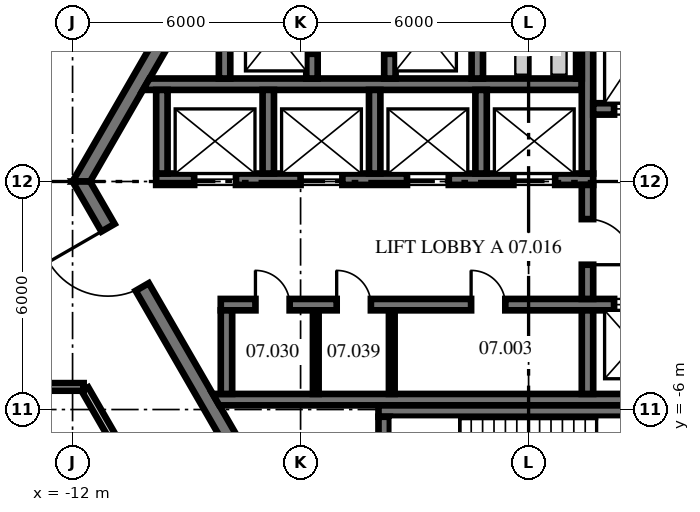
"""IFC4 building model, lengths in metres.
Left out: names, types, materials, properties, quantities, classifications, styles, units other than length and angle.
Written with IfcOpenShell. Run it as: python <this file> out.ifc"""

import sys

from ifc_helpers import new_model, si_unit, direction, frame, frame_2d, origin, place, context, subcontext, project, spatial, polyline, rectangle, outline, extrude, source, transform, mapped, element, fill, save


model = new_model("IFC4")
c1 = context("Model", 3, precision=1e-05, world=origin(), true_north=direction((0.0, 1.0)))
c2 = subcontext(c1, "Body", "Model", "MODEL_VIEW")
j1 = project(units=[si_unit("LENGTHUNIT", "METRE"), si_unit("PLANEANGLEUNIT", "RADIAN")], contexts=[c1])
p1 = place(None, origin())
s1 = spatial("IfcSite", under=j1, at=p1, CompositionType="ELEMENT")
p2 = place(p1, origin())
s2 = spatial("IfcBuilding", under=s1, at=p2, CompositionType="ELEMENT")
p3 = place(p2, frame((0.0, 0.0, 33.2)))
s3 = spatial("IfcBuildingStorey", under=s2, at=p3, CompositionType="ELEMENT", Elevation=33.2)
m1 = source(origin(), c2, "Body", "SweptSolid", [
    extrude(outline(polyline([(-0.115, -0.2), (11.885, -0.2), (11.654, 0.2), (0.115, 0.2), (-0.115, -0.2)])), origin(), (0.0, 0.0, 1.0), 4.1),
])
p4 = place(p3, frame((-5.885, 10.192, 0.0), z_axis=(0.0, 0.0, 1.0), x_axis=(-0.499996592174, -0.866027371285, 0.0)))
e1 = element("IfcWall", 1, at=p4, inside=s3, PredefinedType="SHEAR", context=c2, shape_type="MappedRepresentation", body=[
    mapped(m1, transform((0.0, 0.0, 0.0), scale=1.0)),
])
p5 = place(p4, frame((3.185, 0.0, 0.0)))
e2 = element("IfcOpeningElement", 2, at=p5, cuts=e1, PredefinedType="OPENING", context=c2, shape_type="SweptSolid", body=[
    extrude(rectangle(XDim=1.2, YDim=2.1, at=frame_2d((0.6, 1.05))), frame((0.0, 0.21, 0.0), z_axis=(0.0, -1.0, 0.0), x_axis=(1.0, 0.0, 0.0)), (0.0, 0.0, 1.0), 0.42),
])
p6 = place(p3, frame((-11.769, 0.0, 0.0), z_axis=(0.0, 0.0, 1.0), x_axis=(0.499996592174, -0.866027371285, 0.0)))
e3 = element("IfcWall", 3, at=p6, inside=s3, PredefinedType="SHEAR", context=c2, shape_type="MappedRepresentation", body=[
    mapped(m1, transform((0.0, 0.0, 0.0), scale=1.0)),
])
p7 = place(p6, frame((1.405, 0.0, 0.0)))
e4 = element("IfcOpeningElement", 4, at=p7, cuts=e3, PredefinedType="OPENING", context=c2, shape_type="SweptSolid", body=[
    extrude(rectangle(XDim=1.8, YDim=2.1, at=frame_2d((0.9, 1.05))), frame((0.0, 0.21, 0.0), z_axis=(0.0, -1.0, 0.0), x_axis=(1.0, 0.0, 0.0)), (0.0, 0.0, 1.0), 0.42),
])
p8 = place(p6, frame((7.915, 0.0, 0.0)))
e5 = element("IfcOpeningElement", 5, at=p8, cuts=e3, PredefinedType="OPENING", context=c2, shape_type="SweptSolid", body=[
    extrude(rectangle(XDim=1.2, YDim=2.1, at=frame_2d((0.6, 1.05))), frame((0.0, 0.21, 0.0), z_axis=(0.0, -1.0, 0.0), x_axis=(1.0, 0.0, 0.0)), (0.0, 0.0, 1.0), 0.42),
])
m2 = source(origin(), c2, "Body", "SweptSolid", [
    extrude(rectangle(XDim=11.5, YDim=0.3, at=frame_2d((5.75, 0.0))), origin(), (0.0, 0.0, 1.0), 4.1),
])
p9 = place(p3, frame((-9.8, 0.06, 0.0), z_axis=(0.0, 0.0, 1.0), x_axis=(1.0, 0.0, 0.0)))
e6 = element("IfcWall", 6, at=p9, inside=s3, PredefinedType="SHEAR", context=c2, shape_type="MappedRepresentation", body=[
    mapped(m2, transform((0.0, 0.0, 0.0), scale=1.0)),
])
p10 = place(p9, frame((1.0, 0.0, 0.0)))
e7 = element("IfcOpeningElement", 7, at=p10, cuts=e6, PredefinedType="OPENING", context=c2, shape_type="SweptSolid", body=[
    extrude(rectangle(XDim=1.1, YDim=2.1, at=frame_2d((0.55, 1.05))), frame((0.0, 0.16, 0.0), z_axis=(0.0, -1.0, 0.0), x_axis=(1.0, 0.0, 0.0)), (0.0, 0.0, 1.0), 0.32),
])
p11 = place(p9, frame((3.8, 0.0, 0.0)))
e8 = element("IfcOpeningElement", 8, at=p11, cuts=e6, PredefinedType="OPENING", context=c2, shape_type="SweptSolid", body=[
    extrude(rectangle(XDim=1.1, YDim=2.1, at=frame_2d((0.55, 1.05))), frame((0.0, 0.16, 0.0), z_axis=(0.0, -1.0, 0.0), x_axis=(1.0, 0.0, 0.0)), (0.0, 0.0, 1.0), 0.32),
])
p12 = place(p9, frame((6.6, 0.0, 0.0)))
e9 = element("IfcOpeningElement", 9, at=p12, cuts=e6, PredefinedType="OPENING", context=c2, shape_type="SweptSolid", body=[
    extrude(rectangle(XDim=1.1, YDim=2.1, at=frame_2d((0.55, 1.05))), frame((0.0, 0.16, 0.0), z_axis=(0.0, -1.0, 0.0), x_axis=(1.0, 0.0, 0.0)), (0.0, 0.0, 1.0), 0.32),
])
p13 = place(p9, frame((9.4, 0.0, 0.0)))
e10 = element("IfcOpeningElement", 10, at=p13, cuts=e6, PredefinedType="OPENING", context=c2, shape_type="SweptSolid", body=[
    extrude(rectangle(XDim=1.1, YDim=2.1, at=frame_2d((0.55, 1.05))), frame((0.0, 0.16, 0.0), z_axis=(0.0, -1.0, 0.0), x_axis=(1.0, 0.0, 0.0)), (0.0, 0.0, 1.0), 0.32),
])
m3 = source(origin(), c2, "Body", "SweptSolid", [
    extrude(outline(polyline([(11.2, -0.15), (-0.349, -0.15), (-0.176, 0.15), (11.2, 0.15), (11.2, -0.15)])), origin(), (0.0, 0.0, 1.0), 4.1),
])
p14 = place(p3, frame((-9.8, 2.56, 0.0), z_axis=(0.0, 0.0, 1.0), x_axis=(1.0, 0.0, 0.0)))
e11 = element("IfcWall", 11, at=p14, inside=s3, PredefinedType="SHEAR", context=c2, shape_type="MappedRepresentation", body=[
    mapped(m3, transform((0.0, 0.0, 0.0), scale=1.0)),
])
m4 = source(origin(), c2, "Body", "SweptSolid", [
    extrude(rectangle(XDim=4.45, YDim=0.3, at=frame_2d((2.225, 0.0))), origin(), (0.0, 0.0, 1.0), 4.1),
])
p15 = place(p3, frame((1.55, 0.21, 0.0), z_axis=(0.0, 0.0, 1.0), x_axis=(0.0, 1.0, 0.0)))
e12 = element("IfcWall", 12, at=p15, inside=s3, PredefinedType="SHEAR", context=c2, shape_type="MappedRepresentation", body=[
    mapped(m4, transform((0.0, 0.0, 0.0), scale=1.0)),
])
m5 = source(origin(), c2, "Body", "SweptSolid", [
    extrude(rectangle(XDim=3.0, YDim=0.3, at=frame_2d((1.5, 0.0))), origin(), (0.0, 0.0, 1.0), 4.1),
])
p16 = place(p3, frame((1.7, 1.91, 0.0), z_axis=(0.0, 0.0, 1.0), x_axis=(1.0, 0.0, 0.0)))
e13 = element("IfcWall", 13, at=p16, inside=s3, PredefinedType="SHEAR", context=c2, shape_type="MappedRepresentation", body=[
    mapped(m5, transform((0.0, 0.0, 0.0), scale=1.0)),
])
p17 = place(p16, frame((0.55, 0.0, 0.0)))
e14 = element("IfcOpeningElement", 14, at=p17, cuts=e13, PredefinedType="OPENING", context=c2, shape_type="SweptSolid", body=[
    extrude(rectangle(XDim=1.1, YDim=2.1, at=frame_2d((0.55, 1.05))), frame((0.0, 0.16, 0.0), z_axis=(0.0, -1.0, 0.0), x_axis=(1.0, 0.0, 0.0)), (0.0, 0.0, 1.0), 0.32),
])
m6 = source(origin(), c2, "Body", "SweptSolid", [
    extrude(rectangle(XDim=12.8, YDim=0.3, at=frame_2d((6.4, 0.0))), origin(), (0.0, 0.0, 1.0), 4.1),
])
p18 = place(p3, frame((-8.1, -3.24, 0.0), z_axis=(0.0, 0.0, 1.0), x_axis=(1.0, 0.0, 0.0)))
e15 = element("IfcWall", 15, at=p18, inside=s3, PredefinedType="SHEAR", context=c2, shape_type="MappedRepresentation", body=[
    mapped(m6, transform((0.0, 0.0, 0.0), scale=1.0)),
])
p19 = place(p18, frame((0.913, 0.0, 0.0)))
e16 = element("IfcOpeningElement", 16, at=p19, cuts=e15, PredefinedType="OPENING", context=c2, shape_type="SweptSolid", body=[
    extrude(rectangle(XDim=0.9, YDim=2.1, at=frame_2d((0.45, 1.05))), frame((0.0, 0.16, 0.0), z_axis=(0.0, -1.0, 0.0), x_axis=(1.0, 0.0, 0.0)), (0.0, 0.0, 1.0), 0.32),
])
p20 = place(p18, frame((3.05, 0.0, 0.0)))
e17 = element("IfcOpeningElement", 17, at=p20, cuts=e15, PredefinedType="OPENING", context=c2, shape_type="SweptSolid", body=[
    extrude(rectangle(XDim=0.9, YDim=2.1, at=frame_2d((0.45, 1.05))), frame((0.0, 0.16, 0.0), z_axis=(0.0, -1.0, 0.0), x_axis=(1.0, 0.0, 0.0)), (0.0, 0.0, 1.0), 0.32),
])
p21 = place(p18, frame((6.587, 0.0, 0.0)))
e18 = element("IfcOpeningElement", 18, at=p21, cuts=e15, PredefinedType="OPENING", context=c2, shape_type="SweptSolid", body=[
    extrude(rectangle(XDim=0.9, YDim=2.1, at=frame_2d((0.45, 1.05))), frame((0.0, 0.16, 0.0), z_axis=(0.0, -1.0, 0.0), x_axis=(1.0, 0.0, 0.0)), (0.0, 0.0, 1.0), 0.32),
])
p22 = place(p18, frame((10.35, 0.0, 0.0)))
e19 = element("IfcOpeningElement", 19, at=p22, cuts=e15, PredefinedType="OPENING", context=c2, shape_type="SweptSolid", body=[
    extrude(rectangle(XDim=1.1, YDim=2.1, at=frame_2d((0.55, 1.05))), frame((0.0, 0.16, 0.0), z_axis=(0.0, -1.0, 0.0), x_axis=(1.0, 0.0, 0.0)), (0.0, 0.0, 1.0), 0.32),
])
m7 = source(origin(), c2, "Body", "SweptSolid", [
    extrude(outline(polyline([(12.0, -0.15), (-0.04, -0.15), (-0.213, 0.15), (12.0, 0.15), (12.0, -0.15)])), origin(), (0.0, 0.0, 1.0), 4.1),
])
p23 = place(p3, frame((-8.1, -5.74, 0.0), z_axis=(0.0, 0.0, 1.0), x_axis=(1.0, 0.0, 0.0)))
e20 = element("IfcWall", 20, at=p23, inside=s3, PredefinedType="SHEAR", context=c2, shape_type="MappedRepresentation", body=[
    mapped(m7, transform((0.0, 0.0, 0.0), scale=1.0)),
])
m8 = source(origin(), c2, "Body", "SweptSolid", [
    extrude(rectangle(XDim=2.2, YDim=0.3, at=frame_2d((1.1, 0.0))), origin(), (0.0, 0.0, 1.0), 4.1),
])
p24 = place(p3, frame((-7.95, -5.59, 0.0), z_axis=(0.0, 0.0, 1.0), x_axis=(0.0, 1.0, 0.0)))
e21 = element("IfcWall", 21, at=p24, inside=s3, PredefinedType="SHEAR", context=c2, shape_type="MappedRepresentation", body=[
    mapped(m8, transform((0.0, 0.0, 0.0), scale=1.0)),
])
m9 = source(origin(), c2, "Body", "SweptSolid", [
    extrude(rectangle(XDim=2.2, YDim=0.3, at=frame_2d((1.1, 0.0))), origin(), (0.0, 0.0, 1.0), 4.1),
])
p25 = place(p3, frame((-9.65, 0.21, 0.0), z_axis=(0.0, 0.0, 1.0), x_axis=(0.0, 1.0, 0.0)))
e22 = element("IfcWall", 22, at=p25, inside=s3, PredefinedType="SHEAR", context=c2, shape_type="MappedRepresentation", body=[
    mapped(m9, transform((0.0, 0.0, 0.0), scale=1.0)),
])
p26 = place(p3, frame((1.55, -5.59, 0.0), z_axis=(0.0, 0.0, 1.0), x_axis=(0.0, 1.0, 0.0)))
e23 = element("IfcWall", 23, at=p26, inside=s3, PredefinedType="SHEAR", context=c2, shape_type="MappedRepresentation", body=[
    mapped(m8, transform((0.0, 0.0, 0.0), scale=1.0)),
])
p27 = place(p3, frame((1.55, -3.09, 0.0), z_axis=(0.0, 0.0, 1.0), x_axis=(0.0, 1.0, 0.0)))
e24 = element("IfcWall", 24, at=p27, inside=s3, PredefinedType="SHEAR", context=c2, shape_type="MappedRepresentation", body=[
    mapped(m5, transform((0.0, 0.0, 0.0), scale=1.0)),
])
p28 = place(p27, frame((0.9, 0.0, 0.0)))
e25 = element("IfcOpeningElement", 25, at=p28, cuts=e24, PredefinedType="OPENING", context=c2, shape_type="SweptSolid", body=[
    extrude(rectangle(XDim=1.2, YDim=2.1, at=frame_2d((0.6, 1.05))), frame((0.0, 0.16, 0.0), z_axis=(0.0, -1.0, 0.0), x_axis=(1.0, 0.0, 0.0)), (0.0, 0.0, 1.0), 0.32),
])
m10 = source(origin(), c2, "Body", "SweptSolid", [
    extrude(outline(polyline([(0.0, -0.15), (8.95, -0.15), (8.65, 0.15), (0.0, 0.15), (0.0, -0.15)])), origin(), (0.0, 0.0, 1.0), 4.1),
])
p29 = place(p3, frame((-3.95, -6.04, 0.0), z_axis=(0.0, 0.0, 1.0), x_axis=(1.0, 0.0, 0.0)))
e26 = element("IfcWall", 26, at=p29, inside=s3, PredefinedType="SHEAR", context=c2, shape_type="MappedRepresentation", body=[
    mapped(m10, transform((0.0, 0.0, 0.0), scale=1.0)),
])
m11 = source(origin(), c2, "Body", "SweptSolid", [
    extrude(outline(polyline([(3.8, -0.15), (-0.004, -0.15), (-0.004, 0.15), (3.8, 0.15), (3.8, -0.15)])), origin(), (0.0, 0.0, 1.0), 4.1),
])
p30 = place(p3, frame((-3.8, -9.99, 0.0), z_axis=(0.0, 0.0, 1.0), x_axis=(0.0, 1.0, 0.0)))
e27 = element("IfcWall", 27, at=p30, inside=s3, PredefinedType="SHEAR", context=c2, shape_type="MappedRepresentation", body=[
    mapped(m11, transform((0.0, 0.0, 0.0), scale=1.0)),
])
m12 = source(origin(), c2, "Body", "SweptSolid", [
    extrude(rectangle(XDim=2.4, YDim=0.3, at=frame_2d((1.2, 0.0))), origin(), (0.0, 0.0, 1.0), 4.1),
])
p31 = place(p3, frame((-8.0, 2.71, 0.0), z_axis=(0.0, 0.0, 1.0), x_axis=(0.0, 1.0, 0.0)))
e28 = element("IfcWall", 28, at=p31, inside=s3, PredefinedType="SHEAR", context=c2, shape_type="MappedRepresentation", body=[
    mapped(m12, transform((0.0, 0.0, 0.0), scale=1.0)),
])
p32 = place(p3, frame((-5.7, 2.71, 0.0), z_axis=(0.0, 0.0, 1.0), x_axis=(0.0, 1.0, 0.0)))
e29 = element("IfcWall", 29, at=p32, inside=s3, PredefinedType="SHEAR", context=c2, shape_type="MappedRepresentation", body=[
    mapped(m12, transform((0.0, 0.0, 0.0), scale=1.0)),
])
p33 = place(p32, frame((0.65, 0.0, 0.0)))
e30 = element("IfcOpeningElement", 30, at=p33, cuts=e29, PredefinedType="OPENING", context=c2, shape_type="SweptSolid", body=[
    extrude(rectangle(XDim=1.1, YDim=2.1, at=frame_2d((0.55, 1.05))), frame((0.0, 0.16, 0.0), z_axis=(0.0, -1.0, 0.0), x_axis=(1.0, 0.0, 0.0)), (0.0, 0.0, 1.0), 0.32),
])
p34 = place(p3, frame((-3.65, 2.71, 0.0), z_axis=(0.0, 0.0, 1.0), x_axis=(0.0, 1.0, 0.0)))
e31 = element("IfcWall", 31, at=p34, inside=s3, PredefinedType="SHEAR", context=c2, shape_type="MappedRepresentation", body=[
    mapped(m12, transform((0.0, 0.0, 0.0), scale=1.0)),
])
p35 = place(p34, frame((0.65, 0.0, 0.0)))
e32 = element("IfcOpeningElement", 32, at=p35, cuts=e31, PredefinedType="OPENING", context=c2, shape_type="SweptSolid", body=[
    extrude(rectangle(XDim=1.1, YDim=2.1, at=frame_2d((0.55, 1.05))), frame((0.0, 0.16, 0.0), z_axis=(0.0, -1.0, 0.0), x_axis=(1.0, 0.0, 0.0)), (0.0, 0.0, 1.0), 0.32),
])
p36 = place(p3, frame((-1.35, 2.71, 0.0), z_axis=(0.0, 0.0, 1.0), x_axis=(0.0, 1.0, 0.0)))
e33 = element("IfcWall", 33, at=p36, inside=s3, PredefinedType="SHEAR", context=c2, shape_type="MappedRepresentation", body=[
    mapped(m12, transform((0.0, 0.0, 0.0), scale=1.0)),
])
m13 = source(origin(), c2, "Body", "SweptSolid", [
    extrude(rectangle(XDim=3.18, YDim=0.15, at=frame_2d((1.59, 0.0))), origin(), (0.0, 0.0, 1.0), 4.1),
])
p37 = place(p3, frame((1.325, 2.71, 0.0), z_axis=(0.0, 0.0, 1.0), x_axis=(0.0, 1.0, 0.0)))
e34 = element("IfcWall", 34, at=p37, inside=s3, PredefinedType="PARTITIONING", context=c2, shape_type="MappedRepresentation", body=[
    mapped(m13, transform((0.0, 0.0, 0.0), scale=1.0)),
])
p38 = place(p37, frame((2.265, 0.0, 0.0)))
e35 = element("IfcOpeningElement", 35, at=p38, cuts=e34, PredefinedType="OPENING", context=c2, shape_type="SweptSolid", body=[
    extrude(rectangle(XDim=0.9, YDim=2.1, at=frame_2d((0.45, 1.05))), frame((0.0, 0.085, 0.0), z_axis=(0.0, -1.0, 0.0), x_axis=(1.0, 0.0, 0.0)), (0.0, 0.0, 1.0), 0.17),
])
for number, where, z_axis, x_axis in (
    (36, (-6.85, 0.21, 0.0), (0.0, 0.0, 1.0), (0.0, 1.0, 0.0)),
    (37, (-4.05, 0.21, 0.0), (0.0, 0.0, 1.0), (0.0, 1.0, 0.0)),
    (38, (-1.25, 0.21, 0.0), (0.0, 0.0, 1.0), (0.0, 1.0, 0.0)),
):
    element("IfcWall", number, at=place(p3, frame(where, z_axis=z_axis, x_axis=x_axis)), inside=s3, PredefinedType="SHEAR", context=c2, shape_type="MappedRepresentation", body=[
        mapped(m9, transform((0.0, 0.0, 0.0), scale=1.0)),
    ])
m14 = source(origin(), c2, "Body", "SweptSolid", [
    extrude(rectangle(XDim=2.2, YDim=0.15, at=frame_2d((1.1, 0.0))), origin(), (0.0, 0.0, 1.0), 4.1),
])
for number, where, z_axis, x_axis in (
    (39, (-5.6, -5.59, 0.0), (0.0, 0.0, 1.0), (0.0, 1.0, 0.0)),
    (40, (-3.6, -5.59, 0.0), (0.0, 0.0, 1.0), (0.0, 1.0, 0.0)),
):
    element("IfcWall", number, at=place(p3, frame(where, z_axis=z_axis, x_axis=x_axis)), inside=s3, PredefinedType="PARTITIONING", context=c2, shape_type="MappedRepresentation", body=[
        mapped(m14, transform((0.0, 0.0, 0.0), scale=1.0)),
    ])
m15 = source(origin(), c2, "Body", "SweptSolid", [
    extrude(rectangle(XDim=8.478, YDim=0.2, at=frame_2d((4.239, 0.0))), origin(), (0.0, 0.0, 1.0), 4.1),
])
p39 = place(p3, frame((-11.673, -5.466, 0.0), z_axis=(0.0, 0.0, 1.0), x_axis=(0.499985860718, -0.866033566949, 0.0)))
e41 = element("IfcWall", 41, at=p39, inside=s3, PredefinedType="PARTITIONING", context=c2, shape_type="MappedRepresentation", body=[
    mapped(m15, transform((0.0, 0.0, 0.0), scale=1.0)),
])
m16 = source(origin(), c2, "Body", "SweptSolid", [
    extrude(rectangle(XDim=19.789, YDim=0.2, at=frame_2d((9.895, 0.0))), origin(), (0.0, 0.0, 1.0), 4.1),
])
p40 = place(p3, frame((-31.497, -5.405, 0.0), z_axis=(0.0, 0.0, 1.0), x_axis=(1.0, 0.0, 0.0)))
e42 = element("IfcWall", 42, at=p40, inside=s3, PredefinedType="PARTITIONING", context=c2, shape_type="MappedRepresentation", body=[
    mapped(m16, transform((0.0, 0.0, 0.0), scale=1.0)),
])
p41 = place(p40, frame((9.348, 0.0, 0.0)))
e43 = element("IfcOpeningElement", 43, at=p41, cuts=e42, PredefinedType="OPENING", context=c2, shape_type="SweptSolid", body=[
    extrude(rectangle(XDim=1.0, YDim=2.1, at=frame_2d((0.5, 1.05))), frame((0.0, 0.11, 0.0), z_axis=(0.0, -1.0, 0.0), x_axis=(1.0, 0.0, 0.0)), (0.0, 0.0, 1.0), 0.22),
])
m17 = source(origin(), c2, "Body", "SweptSolid", [
    extrude(rectangle(XDim=14.759, YDim=0.2, at=frame_2d((7.379, 0.0))), origin(), (0.0, 0.0, 1.0), 4.1),
])
p42 = place(p3, frame((-14.794, 0.061, 0.0), z_axis=(0.0, 0.0, 1.0), x_axis=(0.49999260588, 0.86602967274, 0.0)))
e44 = element("IfcWall", 44, at=p42, inside=s3, PredefinedType="PARTITIONING", context=c2, shape_type="MappedRepresentation", body=[
    mapped(m17, transform((0.0, 0.0, 0.0), scale=1.0)),
])
p43 = place(p42, frame((9.109, 0.0, 0.0)))
e45 = element("IfcOpeningElement", 45, at=p43, cuts=e44, PredefinedType="OPENING", context=c2, shape_type="SweptSolid", body=[
    extrude(rectangle(XDim=1.0, YDim=2.1, at=frame_2d((0.5, 1.05))), frame((0.0, 0.11, 0.0), z_axis=(0.0, -1.0, 0.0), x_axis=(1.0, 0.0, 0.0)), (0.0, 0.0, 1.0), 0.22),
])
p44 = place(p7, frame((1.8, 0.0, 0.0), z_axis=(0.0, 0.0, 1.0), x_axis=(-1.0, 0.0, 0.0)))
e46 = element("IfcDoor", 46, at=p44, inside=s3, OperationType="DOUBLE_DOOR_DOUBLE_SWING", PredefinedType="DOOR", context=c2, shape_type="SweptSolid", body=[
    extrude(rectangle(XDim=1.8, YDim=2.1, at=frame_2d((0.9, 1.05))), frame((0.0, 0.025, 0.0), z_axis=(0.0, -1.0, 0.0), x_axis=(1.0, 0.0, 0.0)), (0.0, 0.0, 1.0), 0.05),
])
fill(e4, e46)
p45 = place(p28, frame((1.2, 0.0, 0.0), z_axis=(0.0, 0.0, 1.0), x_axis=(-1.0, 0.0, 0.0)))
e47 = element("IfcDoor", 47, at=p45, inside=s3, OperationType="SINGLE_SWING_RIGHT", PredefinedType="DOOR", context=c2, shape_type="SweptSolid", body=[
    extrude(rectangle(XDim=1.2, YDim=2.1, at=frame_2d((0.6, 1.05))), frame((0.0, 0.025, 0.0), z_axis=(0.0, -1.0, 0.0), x_axis=(1.0, 0.0, 0.0)), (0.0, 0.0, 1.0), 0.05),
])
fill(e25, e47)
p46 = place(p19, origin())
e48 = element("IfcDoor", 48, at=p46, inside=s3, OperationType="SINGLE_SWING_LEFT", PredefinedType="DOOR", context=c2, shape_type="SweptSolid", body=[
    extrude(rectangle(XDim=0.9, YDim=2.1, at=frame_2d((0.45, 1.05))), frame((0.0, 0.025, 0.0), z_axis=(0.0, -1.0, 0.0), x_axis=(1.0, 0.0, 0.0)), (0.0, 0.0, 1.0), 0.05),
])
fill(e16, e48)
p47 = place(p20, origin())
e49 = element("IfcDoor", 49, at=p47, inside=s3, OperationType="SINGLE_SWING_LEFT", PredefinedType="DOOR", context=c2, shape_type="SweptSolid", body=[
    extrude(rectangle(XDim=0.9, YDim=2.1, at=frame_2d((0.45, 1.05))), frame((0.0, 0.025, 0.0), z_axis=(0.0, -1.0, 0.0), x_axis=(1.0, 0.0, 0.0)), (0.0, 0.0, 1.0), 0.05),
])
fill(e17, e49)
p48 = place(p21, origin())
e50 = element("IfcDoor", 50, at=p48, inside=s3, OperationType="SINGLE_SWING_LEFT", PredefinedType="DOOR", context=c2, shape_type="SweptSolid", body=[
    extrude(rectangle(XDim=0.9, YDim=2.1, at=frame_2d((0.45, 1.05))), frame((0.0, 0.025, 0.0), z_axis=(0.0, -1.0, 0.0), x_axis=(1.0, 0.0, 0.0)), (0.0, 0.0, 1.0), 0.05),
])
fill(e18, e50)
p49 = place(p10, origin())
e51 = element("IfcDoor", 51, at=p49, inside=s3, OperationType="DOUBLE_DOOR_SLIDING", PredefinedType="DOOR", context=c2, shape_type="SweptSolid", body=[
    extrude(rectangle(XDim=1.1, YDim=2.1, at=frame_2d((0.55, 1.05))), frame((0.0, 0.025, 0.0), z_axis=(0.0, -1.0, 0.0), x_axis=(1.0, 0.0, 0.0)), (0.0, 0.0, 1.0), 0.05),
])
fill(e7, e51)
p50 = place(p11, origin())
e52 = element("IfcDoor", 52, at=p50, inside=s3, OperationType="DOUBLE_DOOR_SLIDING", PredefinedType="DOOR", context=c2, shape_type="SweptSolid", body=[
    extrude(rectangle(XDim=1.1, YDim=2.1, at=frame_2d((0.55, 1.05))), frame((0.0, 0.025, 0.0), z_axis=(0.0, -1.0, 0.0), x_axis=(1.0, 0.0, 0.0)), (0.0, 0.0, 1.0), 0.05),
])
fill(e8, e52)
p51 = place(p12, origin())
e53 = element("IfcDoor", 53, at=p51, inside=s3, OperationType="DOUBLE_DOOR_SLIDING", PredefinedType="DOOR", context=c2, shape_type="SweptSolid", body=[
    extrude(rectangle(XDim=1.1, YDim=2.1, at=frame_2d((0.55, 1.05))), frame((0.0, 0.025, 0.0), z_axis=(0.0, -1.0, 0.0), x_axis=(1.0, 0.0, 0.0)), (0.0, 0.0, 1.0), 0.05),
])
fill(e9, e53)
p52 = place(p13, origin())
e54 = element("IfcDoor", 54, at=p52, inside=s3, OperationType="DOUBLE_DOOR_SLIDING", PredefinedType="DOOR", context=c2, shape_type="SweptSolid", body=[
    extrude(rectangle(XDim=1.1, YDim=2.1, at=frame_2d((0.55, 1.05))), frame((0.0, 0.025, 0.0), z_axis=(0.0, -1.0, 0.0), x_axis=(1.0, 0.0, 0.0)), (0.0, 0.0, 1.0), 0.05),
])
fill(e10, e54)
p53 = place(p17, origin())
e55 = element("IfcDoor", 55, at=p53, inside=s3, OperationType="DOUBLE_DOOR_SLIDING", PredefinedType="DOOR", context=c2, shape_type="SweptSolid", body=[
    extrude(rectangle(XDim=1.1, YDim=2.1, at=frame_2d((0.55, 1.05))), frame((0.0, 0.025, 0.0), z_axis=(0.0, -1.0, 0.0), x_axis=(1.0, 0.0, 0.0)), (0.0, 0.0, 1.0), 0.05),
])
fill(e14, e55)
p54 = place(p22, origin())
e56 = element("IfcDoor", 56, at=p54, inside=s3, OperationType="DOUBLE_DOOR_SLIDING", PredefinedType="DOOR", context=c2, shape_type="SweptSolid", body=[
    extrude(rectangle(XDim=1.1, YDim=2.1, at=frame_2d((0.55, 1.05))), frame((0.0, 0.025, 0.0), z_axis=(0.0, -1.0, 0.0), x_axis=(1.0, 0.0, 0.0)), (0.0, 0.0, 1.0), 0.05),
])
fill(e19, e56)
p55 = place(p33, origin())
e57 = element("IfcDoor", 57, at=p55, inside=s3, OperationType="DOUBLE_DOOR_SLIDING", PredefinedType="DOOR", context=c2, shape_type="SweptSolid", body=[
    extrude(rectangle(XDim=1.1, YDim=2.1, at=frame_2d((0.55, 1.05))), frame((0.0, 0.025, 0.0), z_axis=(0.0, -1.0, 0.0), x_axis=(1.0, 0.0, 0.0)), (0.0, 0.0, 1.0), 0.05),
])
fill(e30, e57)
p56 = place(p35, origin())
e58 = element("IfcDoor", 58, at=p56, inside=s3, OperationType="DOUBLE_DOOR_SLIDING", PredefinedType="DOOR", context=c2, shape_type="SweptSolid", body=[
    extrude(rectangle(XDim=1.1, YDim=2.1, at=frame_2d((0.55, 1.05))), frame((0.0, 0.025, 0.0), z_axis=(0.0, -1.0, 0.0), x_axis=(1.0, 0.0, 0.0)), (0.0, 0.0, 1.0), 0.05),
])
fill(e32, e58)
save(model, sys.argv[1])
